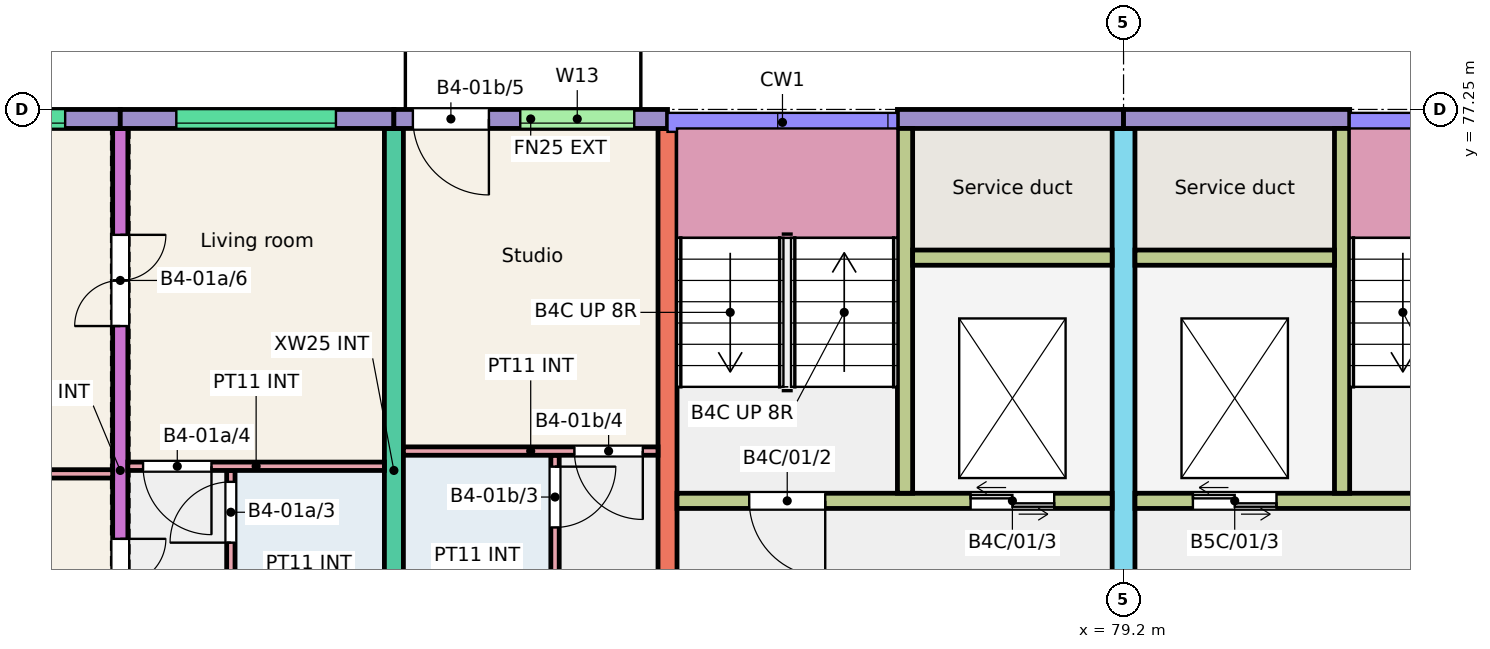
"""IFC4 building model, lengths in metres.
Left out: names, types, materials, properties, quantities, classifications, styles, units other than length and angle.
Written with IfcOpenShell. Run it as: python <this file> out.ifc"""

import sys

from ifc_helpers import new_model, si_unit, direction, frame, frame_2d, origin, place, context, subcontext, project, spatial, rectangle, extrude, element, fill, save


model = new_model("IFC4")
c1 = context("Model", 3, precision=1e-05, world=origin(), true_north=direction((0.0, 1.0)))
c2 = subcontext(c1, "Body", "Model", "MODEL_VIEW")
j1 = project(units=[si_unit("LENGTHUNIT", "METRE"), si_unit("PLANEANGLEUNIT", "RADIAN")], contexts=[c1])
p1 = place(None, origin())
s1 = spatial("IfcSite", under=j1, at=p1, CompositionType="ELEMENT")
p2 = place(p1, origin())
s2 = spatial("IfcBuilding", under=s1, at=p2, CompositionType="ELEMENT")
p3 = place(p2, frame((0.0, 0.0, 3.0)))
s3 = spatial("IfcBuildingStorey", under=s2, at=p3, CompositionType="ELEMENT", Elevation=3.0)
p4 = place(p3, frame((66.0, 68.0, 0.0), z_axis=(0.0, 0.0, 1.0), x_axis=(0.0, 1.0, 0.0)))
e1 = element("IfcWall", 1, at=p4, inside=s3, PredefinedType="SHEAR", context=c2, shape_type="SweptSolid", body=[
    extrude(rectangle(XDim=9.0, YDim=0.2, at=frame_2d((4.5, 0.0))), origin(), (0.0, 0.0, 1.0), 3.0),
])
p5 = place(p4, frame((2.4, 0.0, 0.0)))
e2 = element("IfcOpeningElement", 2, at=p5, cuts=e1, PredefinedType="OPENING", context=c2, shape_type="SweptSolid", body=[
    extrude(rectangle(XDim=1.2, YDim=2.1, at=frame_2d((0.6, 1.05))), frame((0.0, 0.11, 0.0), z_axis=(0.0, -1.0, 0.0), x_axis=(1.0, 0.0, 0.0)), (0.0, 0.0, 1.0), 0.22),
])
p6 = place(p4, frame((6.4, 0.0, 0.0)))
e3 = element("IfcOpeningElement", 3, at=p6, cuts=e1, PredefinedType="OPENING", context=c2, shape_type="SweptSolid", body=[
    extrude(rectangle(XDim=1.2, YDim=2.1, at=frame_2d((0.6, 1.05))), frame((0.0, 0.11, 0.0), z_axis=(0.0, -1.0, 0.0), x_axis=(1.0, 0.0, 0.0)), (0.0, 0.0, 1.0), 0.22),
])
for number, where, z_axis, x_axis in (
    (4, (69.6, 68.0, 0.0), (0.0, 0.0, 1.0), (0.0, 1.0, 0.0)),
    (5, (73.2, 68.0, 0.0), (0.0, 0.0, 1.0), (0.0, 1.0, 0.0)),
):
    element("IfcWall", number, at=place(p3, frame(where, z_axis=z_axis, x_axis=x_axis)), inside=s3, PredefinedType="SHEAR", context=c2, shape_type="SweptSolid", body=[
        extrude(rectangle(XDim=9.0, YDim=0.25, at=frame_2d((4.5, 0.0))), origin(), (0.0, 0.0, 1.0), 3.0),
    ])
p7 = place(p3, frame((79.2, 66.0, 0.0), z_axis=(0.0, 0.0, 1.0), x_axis=(0.0, 1.0, 0.0)))
e6 = element("IfcWall", 6, at=p7, inside=s3, PredefinedType="SHEAR", context=c2, shape_type="SweptSolid", body=[
    extrude(rectangle(XDim=11.0, YDim=0.3, at=frame_2d((5.5, 0.0))), origin(), (0.0, 0.0, 1.0), 3.0),
])
p8 = place(p7, frame((0.3, 0.0, 0.0)))
e7 = element("IfcOpeningElement", 7, at=p8, cuts=e6, PredefinedType="OPENING", context=c2, shape_type="SweptSolid", body=[
    extrude(rectangle(XDim=1.2, YDim=2.1, at=frame_2d((0.6, 1.05))), frame((0.0, 0.16, 0.0), z_axis=(0.0, -1.0, 0.0), x_axis=(1.0, 0.0, 0.0)), (0.0, 0.0, 1.0), 0.32),
])
p9 = place(p3, frame((62.4, 77.125, 0.0), z_axis=(0.0, 0.0, 1.0), x_axis=(1.0, 0.0, 0.0)))
e8 = element("IfcWall", 8, at=p9, inside=s3, PredefinedType="SOLIDWALL", context=c2, shape_type="SweptSolid", body=[
    extrude(rectangle(XDim=3.6, YDim=0.25, at=frame_2d((1.8, 0.0))), origin(), (0.0, 0.0, 1.0), 3.0),
])
p10 = place(p9, frame((0.775, 0.0, 1.2)))
e9 = element("IfcOpeningElement", 9, at=p10, cuts=e8, PredefinedType="OPENING", context=c2, shape_type="SweptSolid", body=[
    extrude(rectangle(XDim=2.1, YDim=1.2, at=frame_2d((1.05, 0.6))), frame((0.0, 0.135, 0.0), z_axis=(0.0, -1.0, 0.0), x_axis=(1.0, 0.0, 0.0)), (0.0, 0.0, 1.0), 0.27),
])
p11 = place(p3, frame((66.0, 77.125, 0.0), z_axis=(0.0, 0.0, 1.0), x_axis=(1.0, 0.0, 0.0)))
e10 = element("IfcWall", 10, at=p11, inside=s3, PredefinedType="SOLIDWALL", context=c2, shape_type="SweptSolid", body=[
    extrude(rectangle(XDim=3.6, YDim=0.25, at=frame_2d((1.8, 0.0))), origin(), (0.0, 0.0, 1.0), 3.0),
])
p12 = place(p11, frame((0.738, 0.0, 1.2)))
e11 = element("IfcOpeningElement", 11, at=p12, cuts=e10, PredefinedType="OPENING", context=c2, shape_type="SweptSolid", body=[
    extrude(rectangle(XDim=2.1, YDim=1.2, at=frame_2d((1.05, 0.6))), frame((0.0, 0.135, 0.0), z_axis=(0.0, -1.0, 0.0), x_axis=(1.0, 0.0, 0.0)), (0.0, 0.0, 1.0), 0.27),
])
p13 = place(p3, frame((69.6, 77.125, 0.0), z_axis=(0.0, 0.0, 1.0), x_axis=(1.0, 0.0, 0.0)))
e12 = element("IfcWall", 12, at=p13, inside=s3, PredefinedType="SOLIDWALL", context=c2, shape_type="SweptSolid", body=[
    extrude(rectangle(XDim=3.6, YDim=0.25, at=frame_2d((1.8, 0.0))), origin(), (0.0, 0.0, 1.0), 3.0),
])
p14 = place(p13, frame((1.663, 0.0, 1.2)))
e13 = element("IfcOpeningElement", 13, at=p14, cuts=e12, PredefinedType="OPENING", context=c2, shape_type="SweptSolid", body=[
    extrude(rectangle(XDim=1.5, YDim=1.2, at=frame_2d((0.75, 0.6))), frame((0.0, 0.135, 0.0), z_axis=(0.0, -1.0, 0.0), x_axis=(1.0, 0.0, 0.0)), (0.0, 0.0, 1.0), 0.27),
])
p15 = place(p13, frame((0.25, 0.0, 0.0)))
e14 = element("IfcOpeningElement", 14, at=p15, cuts=e12, PredefinedType="OPENING", context=c2, shape_type="SweptSolid", body=[
    extrude(rectangle(XDim=1.0, YDim=2.1, at=frame_2d((0.5, 1.05))), frame((0.0, 0.135, 0.0), z_axis=(0.0, -1.0, 0.0), x_axis=(1.0, 0.0, 0.0)), (0.0, 0.0, 1.0), 0.27),
])
p16 = place(p3, frame((76.225, 77.125, 0.0), z_axis=(0.0, 0.0, 1.0), x_axis=(1.0, 0.0, 0.0)))
e15 = element("IfcWall", 15, at=p16, inside=s3, PredefinedType="SOLIDWALL", context=c2, shape_type="SweptSolid", body=[
    extrude(rectangle(XDim=2.975, YDim=0.25, at=frame_2d((1.487, 0.0))), origin(), (0.0, 0.0, 1.0), 3.0),
])
p17 = place(p3, frame((73.325, 72.1, 0.0), z_axis=(0.0, 0.0, 1.0), x_axis=(1.0, 0.0, 0.0)))
e16 = element("IfcWall", 16, at=p17, inside=s3, PredefinedType="SHEAR", context=c2, shape_type="SweptSolid", body=[
    extrude(rectangle(XDim=5.725, YDim=0.2, at=frame_2d((2.863, 0.0))), origin(), (0.0, 0.0, 1.0), 3.0),
])
p18 = place(p17, frame((0.95, 0.0, 0.0)))
e17 = element("IfcOpeningElement", 17, at=p18, cuts=e16, PredefinedType="OPENING", context=c2, shape_type="SweptSolid", body=[
    extrude(rectangle(XDim=1.0, YDim=2.1, at=frame_2d((0.5, 1.05))), frame((0.0, 0.11, 0.0), z_axis=(0.0, -1.0, 0.0), x_axis=(1.0, 0.0, 0.0)), (0.0, 0.0, 1.0), 0.22),
])
p19 = place(p17, frame((3.863, 0.0, 0.0)))
e18 = element("IfcOpeningElement", 18, at=p19, cuts=e16, PredefinedType="OPENING", context=c2, shape_type="SweptSolid", body=[
    extrude(rectangle(XDim=1.1, YDim=2.1, at=frame_2d((0.55, 1.05))), frame((0.0, 0.11, 0.0), z_axis=(0.0, -1.0, 0.0), x_axis=(1.0, 0.0, 0.0)), (0.0, 0.0, 1.0), 0.22),
])
p20 = place(p3, frame((76.325, 72.2, 0.0), z_axis=(0.0, 0.0, 1.0), x_axis=(0.0, 1.0, 0.0)))
e19 = element("IfcWall", 19, at=p20, inside=s3, PredefinedType="SHEAR", context=c2, shape_type="SweptSolid", body=[
    extrude(rectangle(XDim=4.8, YDim=0.2, at=frame_2d((2.4, 0.0))), origin(), (0.0, 0.0, 1.0), 3.0),
])
p21 = place(p3, frame((76.425, 75.3, 0.0), z_axis=(0.0, 0.0, 1.0), x_axis=(1.0, 0.0, 0.0)))
e20 = element("IfcWall", 20, at=p21, inside=s3, PredefinedType="SHEAR", context=c2, shape_type="SweptSolid", body=[
    extrude(rectangle(XDim=2.625, YDim=0.2, at=frame_2d((1.312, 0.0))), origin(), (0.0, 0.0, 1.0), 3.0),
])
p22 = place(p3, frame((79.2, 77.125, 0.0), z_axis=(0.0, 0.0, 1.0), x_axis=(1.0, 0.0, 0.0)))
e21 = element("IfcWall", 21, at=p22, inside=s3, PredefinedType="SOLIDWALL", context=c2, shape_type="SweptSolid", body=[
    extrude(rectangle(XDim=2.975, YDim=0.25, at=frame_2d((1.488, 0.0))), origin(), (0.0, 0.0, 1.0), 3.0),
])
p23 = place(p3, frame((79.35, 72.1, 0.0), z_axis=(0.0, 0.0, 1.0), x_axis=(1.0, 0.0, 0.0)))
e22 = element("IfcWall", 22, at=p23, inside=s3, PredefinedType="SHEAR", context=c2, shape_type="SweptSolid", body=[
    extrude(rectangle(XDim=5.725, YDim=0.2, at=frame_2d((2.862, 0.0))), origin(), (0.0, 0.0, 1.0), 3.0),
])
p24 = place(p23, frame((3.775, 0.0, 0.0)))
e23 = element("IfcOpeningElement", 23, at=p24, cuts=e22, PredefinedType="OPENING", context=c2, shape_type="SweptSolid", body=[
    extrude(rectangle(XDim=1.0, YDim=2.1, at=frame_2d((0.5, 1.05))), frame((0.0, 0.11, 0.0), z_axis=(0.0, -1.0, 0.0), x_axis=(1.0, 0.0, 0.0)), (0.0, 0.0, 1.0), 0.22),
])
p25 = place(p23, frame((0.762, 0.0, 0.0)))
e24 = element("IfcOpeningElement", 24, at=p25, cuts=e22, PredefinedType="OPENING", context=c2, shape_type="SweptSolid", body=[
    extrude(rectangle(XDim=1.1, YDim=2.1, at=frame_2d((0.55, 1.05))), frame((0.0, 0.11, 0.0), z_axis=(0.0, -1.0, 0.0), x_axis=(1.0, 0.0, 0.0)), (0.0, 0.0, 1.0), 0.22),
])
p26 = place(p3, frame((82.075, 72.2, 0.0), z_axis=(0.0, 0.0, 1.0), x_axis=(0.0, 1.0, 0.0)))
e25 = element("IfcWall", 25, at=p26, inside=s3, PredefinedType="SHEAR", context=c2, shape_type="SweptSolid", body=[
    extrude(rectangle(XDim=4.8, YDim=0.2, at=frame_2d((2.4, 0.0))), origin(), (0.0, 0.0, 1.0), 3.0),
])
p27 = place(p3, frame((79.35, 75.3, 0.0), z_axis=(0.0, 0.0, 1.0), x_axis=(1.0, 0.0, 0.0)))
e26 = element("IfcWall", 26, at=p27, inside=s3, PredefinedType="SHEAR", context=c2, shape_type="SweptSolid", body=[
    extrude(rectangle(XDim=2.625, YDim=0.2, at=frame_2d((1.312, 0.0))), origin(), (0.0, 0.0, 1.0), 3.0),
])
p28 = place(p3, frame((67.455, 68.0, 0.0), z_axis=(0.0, 0.0, 1.0), x_axis=(0.0, 1.0, 0.0)))
e27 = element("IfcWall", 27, at=p28, inside=s3, PredefinedType="PARTITIONING", context=c2, shape_type="SweptSolid", body=[
    extrude(rectangle(XDim=4.5, YDim=0.11, at=frame_2d((2.25, 0.0))), origin(), (0.0, 0.0, 1.0), 2.8),
])
p29 = place(p28, frame((0.2, 0.0, 0.0)))
e28 = element("IfcOpeningElement", 28, at=p29, cuts=e27, PredefinedType="OPENING", context=c2, shape_type="SweptSolid", body=[
    extrude(rectangle(XDim=0.8, YDim=2.1, at=frame_2d((0.4, 1.05))), frame((0.0, 0.065, 0.0), z_axis=(0.0, -1.0, 0.0), x_axis=(1.0, 0.0, 0.0)), (0.0, 0.0, 1.0), 0.13),
])
p30 = place(p28, frame((3.55, 0.0, 0.0)))
e29 = element("IfcOpeningElement", 29, at=p30, cuts=e27, PredefinedType="OPENING", context=c2, shape_type="SweptSolid", body=[
    extrude(rectangle(XDim=0.8, YDim=2.1, at=frame_2d((0.4, 1.05))), frame((0.0, 0.065, 0.0), z_axis=(0.0, -1.0, 0.0), x_axis=(1.0, 0.0, 0.0)), (0.0, 0.0, 1.0), 0.13),
])
p31 = place(p3, frame((66.1, 72.555, 0.0), z_axis=(0.0, 0.0, 1.0), x_axis=(1.0, 0.0, 0.0)))
e30 = element("IfcWall", 30, at=p31, inside=s3, PredefinedType="PARTITIONING", context=c2, shape_type="SweptSolid", body=[
    extrude(rectangle(XDim=3.375, YDim=0.11, at=frame_2d((1.688, 0.0))), origin(), (0.0, 0.0, 1.0), 2.8),
])
p32 = place(p31, frame((0.2, 0.0, 0.0)))
e31 = element("IfcOpeningElement", 31, at=p32, cuts=e30, PredefinedType="OPENING", context=c2, shape_type="SweptSolid", body=[
    extrude(rectangle(XDim=0.9, YDim=2.1, at=frame_2d((0.45, 1.05))), frame((0.0, 0.065, 0.0), z_axis=(0.0, -1.0, 0.0), x_axis=(1.0, 0.0, 0.0)), (0.0, 0.0, 1.0), 0.13),
])
p33 = place(p3, frame((62.55, 72.455, 0.0), z_axis=(0.0, 0.0, 1.0), x_axis=(1.0, 0.0, 0.0)))
e32 = element("IfcWall", 32, at=p33, inside=s3, PredefinedType="PARTITIONING", context=c2, shape_type="SweptSolid", body=[
    extrude(rectangle(XDim=3.35, YDim=0.11, at=frame_2d((1.675, 0.0))), origin(), (0.0, 0.0, 1.0), 2.8),
])
p34 = place(p3, frame((71.72, 68.0, 0.0), z_axis=(0.0, 0.0, 1.0), x_axis=(0.0, 1.0, 0.0)))
e33 = element("IfcWall", 33, at=p34, inside=s3, PredefinedType="PARTITIONING", context=c2, shape_type="SweptSolid", body=[
    extrude(rectangle(XDim=4.7, YDim=0.11, at=frame_2d((2.35, 0.0))), origin(), (0.0, 0.0, 1.0), 2.8),
])
p35 = place(p34, frame((0.2, 0.0, 0.0)))
e34 = element("IfcOpeningElement", 34, at=p35, cuts=e33, PredefinedType="OPENING", context=c2, shape_type="SweptSolid", body=[
    extrude(rectangle(XDim=0.8, YDim=2.1, at=frame_2d((0.4, 1.05))), frame((0.0, 0.065, 0.0), z_axis=(0.0, -1.0, 0.0), x_axis=(1.0, 0.0, 0.0)), (0.0, 0.0, 1.0), 0.13),
])
p36 = place(p34, frame((3.75, 0.0, 0.0)))
e35 = element("IfcOpeningElement", 35, at=p36, cuts=e33, PredefinedType="OPENING", context=c2, shape_type="SweptSolid", body=[
    extrude(rectangle(XDim=0.8, YDim=2.1, at=frame_2d((0.4, 1.05))), frame((0.0, 0.065, 0.0), z_axis=(0.0, -1.0, 0.0), x_axis=(1.0, 0.0, 0.0)), (0.0, 0.0, 1.0), 0.13),
])
p37 = place(p3, frame((69.725, 72.755, 0.0), z_axis=(0.0, 0.0, 1.0), x_axis=(1.0, 0.0, 0.0)))
e36 = element("IfcWall", 36, at=p37, inside=s3, PredefinedType="PARTITIONING", context=c2, shape_type="SweptSolid", body=[
    extrude(rectangle(XDim=3.35, YDim=0.11, at=frame_2d((1.675, 0.0))), origin(), (0.0, 0.0, 1.0), 2.8),
])
p38 = place(p37, frame((2.25, 0.0, 0.0)))
e37 = element("IfcOpeningElement", 37, at=p38, cuts=e36, PredefinedType="OPENING", context=c2, shape_type="SweptSolid", body=[
    extrude(rectangle(XDim=0.9, YDim=2.1, at=frame_2d((0.45, 1.05))), frame((0.0, 0.065, 0.0), z_axis=(0.0, -1.0, 0.0), x_axis=(1.0, 0.0, 0.0)), (0.0, 0.0, 1.0), 0.13),
])
p39 = place(p10, origin())
e38 = element("IfcWindow", 38, at=p39, inside=s3, PartitioningType="SINGLE_PANEL", PredefinedType="WINDOW", context=c2, shape_type="SweptSolid", body=[
    extrude(rectangle(XDim=2.1, YDim=1.2, at=frame_2d((1.05, 0.6))), frame((0.0, -0.025, 0.0), z_axis=(0.0, -1.0, 0.0), x_axis=(1.0, 0.0, 0.0)), (0.0, 0.0, 1.0), 0.06),
])
fill(e9, e38)
p40 = place(p12, origin())
e39 = element("IfcWindow", 39, at=p40, inside=s3, PartitioningType="SINGLE_PANEL", PredefinedType="WINDOW", context=c2, shape_type="SweptSolid", body=[
    extrude(rectangle(XDim=2.1, YDim=1.2, at=frame_2d((1.05, 0.6))), frame((0.0, -0.025, 0.0), z_axis=(0.0, -1.0, 0.0), x_axis=(1.0, 0.0, 0.0)), (0.0, 0.0, 1.0), 0.06),
])
fill(e11, e39)
p41 = place(p14, origin())
e40 = element("IfcWindow", 40, at=p41, inside=s3, PartitioningType="SINGLE_PANEL", PredefinedType="WINDOW", context=c2, shape_type="SweptSolid", body=[
    extrude(rectangle(XDim=1.5, YDim=1.2, at=frame_2d((0.75, 0.6))), frame((0.0, -0.025, 0.0), z_axis=(0.0, -1.0, 0.0), x_axis=(1.0, 0.0, 0.0)), (0.0, 0.0, 1.0), 0.06),
])
fill(e13, e40)
p42 = place(p30, origin())
e41 = element("IfcDoor", 41, at=p42, inside=s3, OperationType="SINGLE_SWING_LEFT", PredefinedType="DOOR", context=c2, shape_type="SweptSolid", body=[
    extrude(rectangle(XDim=0.8, YDim=2.1, at=frame_2d((0.4, 1.05))), frame((0.0, 0.025, 0.0), z_axis=(0.0, -1.0, 0.0), x_axis=(1.0, 0.0, 0.0)), (0.0, 0.0, 1.0), 0.05),
])
fill(e29, e41)
p43 = place(p32, origin())
e42 = element("IfcDoor", 42, at=p43, inside=s3, OperationType="SINGLE_SWING_RIGHT", PredefinedType="DOOR", context=c2, shape_type="SweptSolid", body=[
    extrude(rectangle(XDim=0.9, YDim=2.1, at=frame_2d((0.45, 1.05))), frame((0.0, 0.025, 0.0), z_axis=(0.0, -1.0, 0.0), x_axis=(1.0, 0.0, 0.0)), (0.0, 0.0, 1.0), 0.05),
])
fill(e31, e42)
p44 = place(p5, origin())
e43 = element("IfcDoor", 43, at=p44, inside=s3, OperationType="DOUBLE_DOOR_SINGLE_SWING", PredefinedType="DOOR", context=c2, shape_type="SweptSolid", body=[
    extrude(rectangle(XDim=1.2, YDim=2.1, at=frame_2d((0.6, 1.05))), frame((0.0, 0.025, 0.0), z_axis=(0.0, -1.0, 0.0), x_axis=(1.0, 0.0, 0.0)), (0.0, 0.0, 1.0), 0.05),
])
fill(e2, e43)
p45 = place(p6, origin())
e44 = element("IfcDoor", 44, at=p45, inside=s3, OperationType="DOUBLE_DOOR_SINGLE_SWING", PredefinedType="DOOR", context=c2, shape_type="SweptSolid", body=[
    extrude(rectangle(XDim=1.2, YDim=2.1, at=frame_2d((0.6, 1.05))), frame((0.0, 0.025, 0.0), z_axis=(0.0, -1.0, 0.0), x_axis=(1.0, 0.0, 0.0)), (0.0, 0.0, 1.0), 0.05),
])
fill(e3, e44)
p46 = place(p36, origin())
e45 = element("IfcDoor", 45, at=p46, inside=s3, OperationType="SINGLE_SWING_RIGHT", PredefinedType="DOOR", context=c2, shape_type="SweptSolid", body=[
    extrude(rectangle(XDim=0.8, YDim=2.1, at=frame_2d((0.4, 1.05))), frame((0.0, 0.025, 0.0), z_axis=(0.0, -1.0, 0.0), x_axis=(1.0, 0.0, 0.0)), (0.0, 0.0, 1.0), 0.05),
])
fill(e35, e45)
p47 = place(p38, origin())
e46 = element("IfcDoor", 46, at=p47, inside=s3, OperationType="SINGLE_SWING_RIGHT", PredefinedType="DOOR", context=c2, shape_type="SweptSolid", body=[
    extrude(rectangle(XDim=0.9, YDim=2.1, at=frame_2d((0.45, 1.05))), frame((0.0, 0.025, 0.0), z_axis=(0.0, -1.0, 0.0), x_axis=(1.0, 0.0, 0.0)), (0.0, 0.0, 1.0), 0.05),
])
fill(e37, e46)
p48 = place(p15, origin())
e47 = element("IfcDoor", 47, at=p48, inside=s3, OperationType="SINGLE_SWING_RIGHT", PredefinedType="DOOR", context=c2, shape_type="SweptSolid", body=[
    extrude(rectangle(XDim=1.0, YDim=2.1, at=frame_2d((0.5, 1.05))), frame((0.0, 0.025, 0.0), z_axis=(0.0, -1.0, 0.0), x_axis=(1.0, 0.0, 0.0)), (0.0, 0.0, 1.0), 0.05),
])
fill(e14, e47)
p49 = place(p18, origin())
e48 = element("IfcDoor", 48, at=p49, inside=s3, OperationType="SINGLE_SWING_RIGHT", PredefinedType="DOOR", context=c2, shape_type="SweptSolid", body=[
    extrude(rectangle(XDim=1.0, YDim=2.1, at=frame_2d((0.5, 1.05))), frame((0.0, 0.025, 0.0), z_axis=(0.0, -1.0, 0.0), x_axis=(1.0, 0.0, 0.0)), (0.0, 0.0, 1.0), 0.05),
])
fill(e17, e48)
p50 = place(p19, origin())
e49 = element("IfcDoor", 49, at=p50, inside=s3, OperationType="DOUBLE_DOOR_SLIDING", PredefinedType="DOOR", context=c2, shape_type="SweptSolid", body=[
    extrude(rectangle(XDim=1.1, YDim=2.1, at=frame_2d((0.55, 1.05))), frame((0.0, 0.025, 0.0), z_axis=(0.0, -1.0, 0.0), x_axis=(1.0, 0.0, 0.0)), (0.0, 0.0, 1.0), 0.05),
])
fill(e18, e49)
p51 = place(p25, origin())
e50 = element("IfcDoor", 50, at=p51, inside=s3, OperationType="DOUBLE_DOOR_SLIDING", PredefinedType="DOOR", context=c2, shape_type="SweptSolid", body=[
    extrude(rectangle(XDim=1.1, YDim=2.1, at=frame_2d((0.55, 1.05))), frame((0.0, 0.025, 0.0), z_axis=(0.0, -1.0, 0.0), x_axis=(1.0, 0.0, 0.0)), (0.0, 0.0, 1.0), 0.05),
])
fill(e24, e50)
save(model, sys.argv[1])
